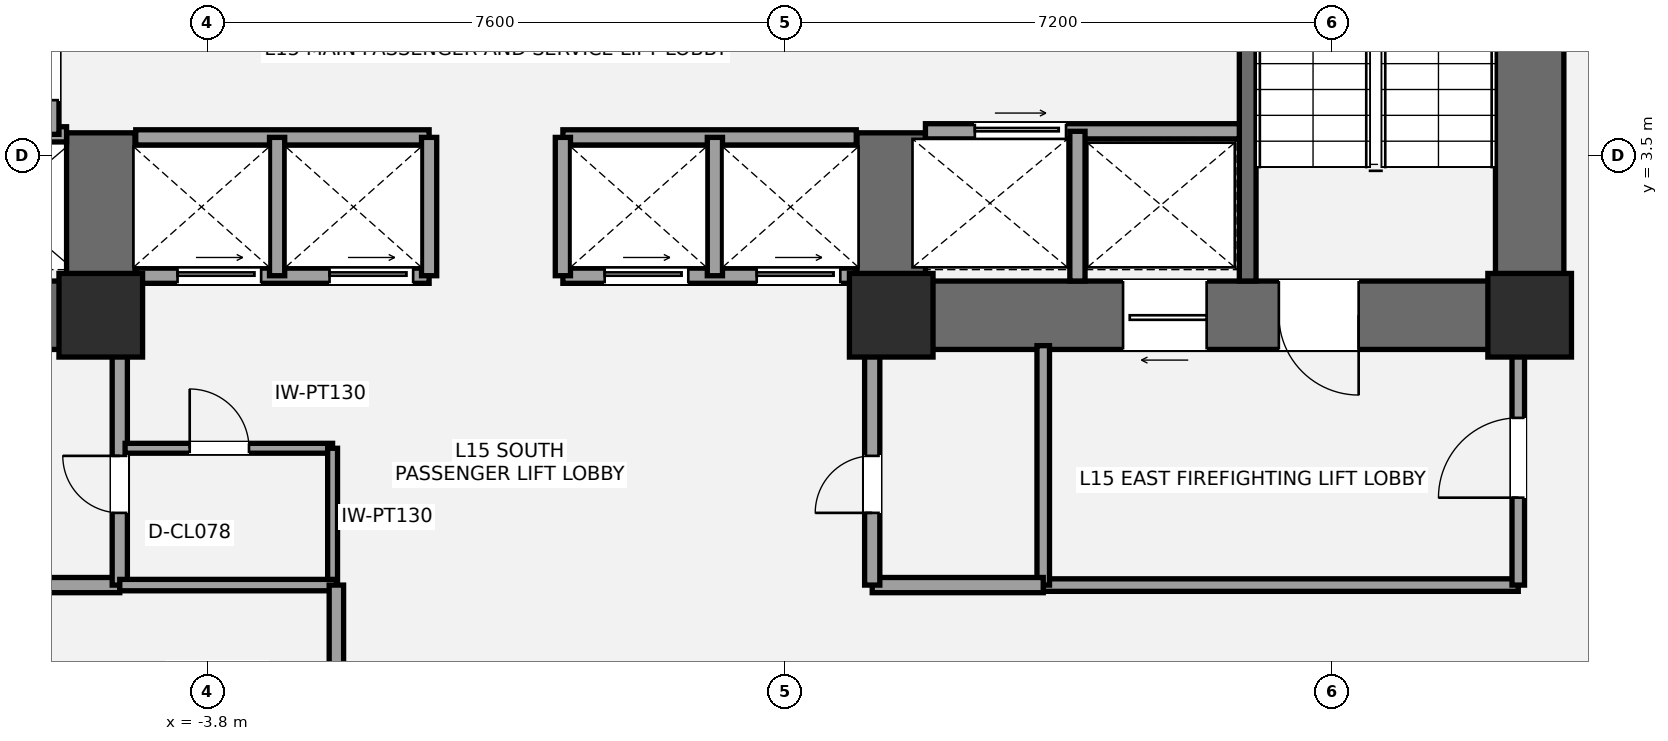
"""IFC4 building model, lengths in metres.
Left out: names, types, materials, properties, quantities, classifications, styles, units other than length and angle.
Written with IfcOpenShell. Run it as: python <this file> out.ifc"""

import sys

from ifc_helpers import new_model, si_unit, direction, frame, frame_2d, origin, origin_2d, place, context, subcontext, project, spatial, rectangle, extrude, element, fill, save


model = new_model("IFC4")
c1 = context("Model", 3, precision=1e-05, world=origin(), true_north=direction((0.0, 1.0)))
c2 = subcontext(c1, "Body", "Model", "MODEL_VIEW")
j1 = project(units=[si_unit("LENGTHUNIT", "METRE"), si_unit("PLANEANGLEUNIT", "RADIAN")], contexts=[c1])
p1 = place(None, origin())
s1 = spatial("IfcSite", under=j1, at=p1, CompositionType="ELEMENT")
p2 = place(p1, origin())
s2 = spatial("IfcBuilding", under=s1, at=p2, CompositionType="ELEMENT")
p3 = place(p2, frame((0.0, 0.0, 59.4)))
s3 = spatial("IfcBuildingStorey", under=s2, at=p3, CompositionType="ELEMENT", Elevation=59.4)
p4 = place(p3, frame((-4.75, 1.4, 0.0), z_axis=(0.0, 0.0, 1.0), x_axis=(-1.0, 0.0, 0.0)))
e1 = element("IfcWall", 1, at=p4, inside=s3, PredefinedType="SHEAR", context=c2, shape_type="SweptSolid", body=[
    extrude(rectangle(XDim=9.3, YDim=0.9, at=frame_2d((4.65, 0.0))), origin(), (0.0, 0.0, 1.0), 3.6),
])
p5 = place(p4, frame((5.55, 0.0, 0.0)))
e2 = element("IfcOpeningElement", 2, at=p5, cuts=e1, PredefinedType="OPENING", context=c2, shape_type="SweptSolid", body=[
    extrude(rectangle(XDim=1.05, YDim=2.15, at=frame_2d((0.525, 1.075))), frame((0.0, 0.46, 0.0), z_axis=(0.0, -1.0, 0.0), x_axis=(1.0, 0.0, 0.0)), (0.0, 0.0, 1.0), 0.92),
])
p6 = place(p4, frame((3.88, 0.0, 0.0)))
e3 = element("IfcOpeningElement", 3, at=p6, cuts=e1, PredefinedType="OPENING", context=c2, shape_type="SweptSolid", body=[
    extrude(rectangle(XDim=1.1, YDim=2.2, at=frame_2d((0.55, 1.1))), frame((0.0, 0.46, 0.0), z_axis=(0.0, -1.0, 0.0), x_axis=(1.0, 0.0, 0.0)), (0.0, 0.0, 1.0), 0.92),
])
p7 = place(p3, frame((-5.2, 0.95, 0.0), z_axis=(0.0, 0.0, 1.0), x_axis=(0.0, 1.0, 0.0)))
e4 = element("IfcWall", 4, at=p7, inside=s3, PredefinedType="SHEAR", context=c2, shape_type="SweptSolid", body=[
    extrude(rectangle(XDim=2.85, YDim=0.9, at=frame_2d((1.425, 0.0))), origin(), (0.0, 0.0, 1.0), 3.6),
])
p8 = place(p3, frame((13.6, 0.95, 0.0), z_axis=(0.0, 0.0, 1.0), x_axis=(0.0, 1.0, 0.0)))
e5 = element("IfcWall", 5, at=p8, inside=s3, PredefinedType="SHEAR", context=c2, shape_type="SweptSolid", body=[
    extrude(rectangle(XDim=8.95, YDim=0.9, at=frame_2d((4.475, 0.0))), origin(), (0.0, 0.0, 1.0), 3.6),
])
p9 = place(p3, frame((14.05, 1.4, 0.0), z_axis=(0.0, 0.0, 1.0), x_axis=(-1.0, 0.0, 0.0)))
e6 = element("IfcWall", 6, at=p9, inside=s3, PredefinedType="SHEAR", context=c2, shape_type="SweptSolid", body=[
    extrude(rectangle(XDim=9.3, YDim=0.9, at=frame_2d((4.65, 0.0))), origin(), (0.0, 0.0, 1.0), 3.6),
])
p10 = place(p9, frame((2.7, 0.0, 0.0)))
e7 = element("IfcOpeningElement", 7, at=p10, cuts=e6, PredefinedType="OPENING", context=c2, shape_type="SweptSolid", body=[
    extrude(rectangle(XDim=1.05, YDim=2.15, at=frame_2d((0.525, 1.075))), frame((0.0, 0.46, 0.0), z_axis=(0.0, -1.0, 0.0), x_axis=(1.0, 0.0, 0.0)), (0.0, 0.0, 1.0), 0.92),
])
p11 = place(p9, frame((4.7, 0.0, 0.0)))
e8 = element("IfcOpeningElement", 8, at=p11, cuts=e6, PredefinedType="OPENING", context=c2, shape_type="SweptSolid", body=[
    extrude(rectangle(XDim=1.1, YDim=2.2, at=frame_2d((0.55, 1.1))), frame((0.0, 0.46, 0.0), z_axis=(0.0, -1.0, 0.0), x_axis=(1.0, 0.0, 0.0)), (0.0, 0.0, 1.0), 0.92),
])
p12 = place(p3, frame((5.2, 0.95, 0.0), z_axis=(0.0, 0.0, 1.0), x_axis=(0.0, 1.0, 0.0)))
e9 = element("IfcWall", 9, at=p12, inside=s3, PredefinedType="SHEAR", context=c2, shape_type="SweptSolid", body=[
    extrude(rectangle(XDim=2.85, YDim=0.9, at=frame_2d((1.425, 0.0))), origin(), (0.0, 0.0, 1.0), 3.6),
])
p13 = place(p3, frame((9.89, 1.85, 0.0), z_axis=(0.0, 0.0, 1.0), x_axis=(0.0, 1.0, 0.0)))
e10 = element("IfcWall", 10, at=p13, inside=s3, PredefinedType="SHEAR", context=c2, shape_type="SweptSolid", body=[
    extrude(rectangle(XDim=7.15, YDim=0.22, at=frame_2d((3.575, 0.0))), origin(), (0.0, 0.0, 1.0), 3.6),
])
for number, where, z_axis, x_axis in (
    (11, (-5.2, 1.4, 0.0), (0.0, 0.0, 1.0), (1.0, 0.0, 0.0)),
    (12, (5.2, 1.4, 0.0), (0.0, 0.0, 1.0), (1.0, 0.0, 0.0)),
    (13, (13.6, 1.4, 0.0), (0.0, 0.0, 1.0), (1.0, 0.0, 0.0)),
):
    element("IfcColumn", number, at=place(p3, frame(where, z_axis=z_axis, x_axis=x_axis)), inside=s3, PredefinedType="COLUMN", context=c2, shape_type="SweptSolid", body=[
        extrude(rectangle(XDim=1.1, YDim=1.1, at=origin_2d()), origin(), (0.0, 0.0, 1.0), 3.6),
    ])
p14 = place(p3, frame((-7.2, -2.15, 0.0), z_axis=(0.0, 0.0, 1.0), x_axis=(1.0, 0.0, 0.0)))
e14 = element("IfcWall", 14, at=p14, inside=s3, PredefinedType="SOLIDWALL", context=c2, shape_type="SweptSolid", body=[
    extrude(rectangle(XDim=2.25, YDim=0.2, at=frame_2d((1.125, 0.0))), origin(), (0.0, 0.0, 1.0), 3.4),
])
p15 = place(p3, frame((-4.95, -2.15, 0.0), z_axis=(0.0, 0.0, 1.0), x_axis=(0.0, 1.0, 0.0)))
e15 = element("IfcWall", 15, at=p15, inside=s3, PredefinedType="SOLIDWALL", context=c2, shape_type="SweptSolid", body=[
    extrude(rectangle(XDim=3.15, YDim=0.2, at=frame_2d((1.575, 0.0))), origin(), (0.0, 0.0, 1.0), 2.853),
])
p16 = place(p15, frame((0.95, 0.0, 0.0)))
e16 = element("IfcOpeningElement", 16, at=p16, cuts=e15, PredefinedType="OPENING", context=c2, shape_type="SweptSolid", body=[
    extrude(rectangle(XDim=0.75, YDim=2.1, at=frame_2d((0.375, 1.05))), frame((0.0, 0.11, 0.0), z_axis=(0.0, -1.0, 0.0), x_axis=(1.0, 0.0, 0.0)), (0.0, 0.0, 1.0), 0.22),
])
p17 = place(p3, frame((7.2, -2.15, 0.0), z_axis=(0.0, 0.0, 1.0), x_axis=(1.0, 0.0, 0.0)))
e17 = element("IfcWall", 17, at=p17, inside=s3, PredefinedType="PARTITIONING", context=c2, shape_type="SweptSolid", body=[
    extrude(rectangle(XDim=6.25, YDim=0.165, at=frame_2d((3.125, 0.0))), origin(), (0.0, 0.0, 1.0), 3.4),
])
p18 = place(p3, frame((7.2, -2.15, 0.0), z_axis=(0.0, 0.0, 1.0), x_axis=(0.0, 1.0, 0.0)))
e18 = element("IfcWall", 18, at=p18, inside=s3, PredefinedType="PARTITIONING", context=c2, shape_type="SweptSolid", body=[
    extrude(rectangle(XDim=3.15, YDim=0.165, at=frame_2d((1.575, 0.0))), origin(), (0.0, 0.0, 1.0), 2.853),
])
p19 = place(p3, frame((13.45, -2.15, 0.0), z_axis=(0.0, 0.0, 1.0), x_axis=(0.0, 1.0, 0.0)))
e19 = element("IfcWall", 19, at=p19, inside=s3, PredefinedType="PARTITIONING", context=c2, shape_type="SweptSolid", body=[
    extrude(rectangle(XDim=3.15, YDim=0.165, at=frame_2d((1.575, 0.0))), origin(), (0.0, 0.0, 1.0), 2.853),
])
p20 = place(p19, frame((1.15, 0.0, 0.0)))
e20 = element("IfcOpeningElement", 20, at=p20, cuts=e19, PredefinedType="OPENING", context=c2, shape_type="SweptSolid", body=[
    extrude(rectangle(XDim=1.05, YDim=2.15, at=frame_2d((0.525, 1.075))), frame((0.0, 0.093, 0.0), z_axis=(0.0, -1.0, 0.0), x_axis=(1.0, 0.0, 0.0)), (0.0, 0.0, 1.0), 0.185),
])
p21 = place(p3, frame((4.95, -2.15, 0.0), z_axis=(0.0, 0.0, 1.0), x_axis=(1.0, 0.0, 0.0)))
e21 = element("IfcWall", 21, at=p21, inside=s3, PredefinedType="SOLIDWALL", context=c2, shape_type="SweptSolid", body=[
    extrude(rectangle(XDim=2.25, YDim=0.2, at=frame_2d((1.125, 0.0))), origin(), (0.0, 0.0, 1.0), 3.4),
])
p22 = place(p3, frame((4.95, -2.15, 0.0), z_axis=(0.0, 0.0, 1.0), x_axis=(0.0, 1.0, 0.0)))
e22 = element("IfcWall", 22, at=p22, inside=s3, PredefinedType="SOLIDWALL", context=c2, shape_type="SweptSolid", body=[
    extrude(rectangle(XDim=3.15, YDim=0.2, at=frame_2d((1.575, 0.0))), origin(), (0.0, 0.0, 1.0), 2.853),
])
p23 = place(p22, frame((0.95, 0.0, 0.0)))
e23 = element("IfcOpeningElement", 23, at=p23, cuts=e22, PredefinedType="OPENING", context=c2, shape_type="SweptSolid", body=[
    extrude(rectangle(XDim=0.75, YDim=2.1, at=frame_2d((0.375, 1.05))), frame((0.0, 0.11, 0.0), z_axis=(0.0, -1.0, 0.0), x_axis=(1.0, 0.0, 0.0)), (0.0, 0.0, 1.0), 0.22),
])
p24 = place(p3, frame((-4.88, -0.35, 0.0), z_axis=(0.0, 0.0, 1.0), x_axis=(1.0, 0.0, 0.0)))
e24 = element("IfcWall", 24, at=p24, inside=s3, PredefinedType="PARTITIONING", context=c2, shape_type="SweptSolid", body=[
    extrude(rectangle(XDim=2.73, YDim=0.13, at=frame_2d((1.365, 0.0))), origin(), (0.0, 0.0, 1.0), 3.4),
])
p25 = place(p24, frame((0.85, 0.0, 0.0)))
e25 = element("IfcOpeningElement", 25, at=p25, cuts=e24, PredefinedType="OPENING", context=c2, shape_type="SweptSolid", body=[
    extrude(rectangle(XDim=0.78, YDim=2.1, at=frame_2d((0.39, 1.05))), frame((0.0, 0.075, 0.0), z_axis=(0.0, -1.0, 0.0), x_axis=(1.0, 0.0, 0.0)), (0.0, 0.0, 1.0), 0.15),
])
p26 = place(p3, frame((-2.15, -2.15, 0.0), z_axis=(0.0, 0.0, 1.0), x_axis=(0.0, 1.0, 0.0)))
e26 = element("IfcWall", 26, at=p26, inside=s3, PredefinedType="PARTITIONING", context=c2, shape_type="SweptSolid", body=[
    extrude(rectangle(XDim=1.8, YDim=0.13, at=frame_2d((0.9, 0.0))), origin(), (0.0, 0.0, 1.0), 3.4),
])
p27 = place(p3, frame((-9.78, 3.78, 0.0), z_axis=(0.0, 0.0, 1.0), x_axis=(1.0, 0.0, 0.0)))
e27 = element("IfcWall", 27, at=p27, inside=s3, PredefinedType="SOLIDWALL", context=c2, shape_type="SweptSolid", body=[
    extrude(rectangle(XDim=4.13, YDim=0.2, at=frame_2d((2.065, 0.0))), origin(), (0.0, 0.0, 1.0), 3.4),
])
p28 = place(p3, frame((-5.85, 3.78, 0.0), z_axis=(0.0, 0.0, 1.0), x_axis=(0.0, 1.0, 0.0)))
e28 = element("IfcWall", 28, at=p28, inside=s3, PredefinedType="SOLIDWALL", context=c2, shape_type="SweptSolid", body=[
    extrude(rectangle(XDim=1.69, YDim=0.2, at=frame_2d((0.845, 0.0))), origin(), (0.0, 0.0, 1.0), 3.4),
])
p29 = place(p28, frame((0.45, 0.0, 0.0)))
e29 = element("IfcOpeningElement", 29, at=p29, cuts=e28, PredefinedType="OPENING", context=c2, shape_type="SweptSolid", body=[
    extrude(rectangle(XDim=0.75, YDim=2.1, at=frame_2d((0.375, 1.05))), frame((0.0, 0.11, 0.0), z_axis=(0.0, -1.0, 0.0), x_axis=(1.0, 0.0, 0.0)), (0.0, 0.0, 1.0), 0.22),
])
p30 = place(p3, frame((5.65, 3.82, 0.0), z_axis=(0.0, 0.0, 1.0), x_axis=(1.0, 0.0, 0.0)))
e30 = element("IfcWall", 30, at=p30, inside=s3, PredefinedType="SOLIDWALL", context=c2, shape_type="SweptSolid", body=[
    extrude(rectangle(XDim=4.13, YDim=0.2, at=frame_2d((2.065, 0.0))), origin(), (0.0, 0.0, 1.0), 3.4),
])
p31 = place(p30, frame((0.65, 0.0, 0.0)))
e31 = element("IfcOpeningElement", 31, at=p31, cuts=e30, PredefinedType="OPENING", context=c2, shape_type="SweptSolid", body=[
    extrude(rectangle(XDim=1.2, YDim=2.2, at=frame_2d((0.6, 1.1))), frame((0.0, 0.11, 0.0), z_axis=(0.0, -1.0, 0.0), x_axis=(1.0, 0.0, 0.0)), (0.0, 0.0, 1.0), 0.22),
])
p32 = place(p3, frame((7.65, 1.85, 0.0), z_axis=(0.0, 0.0, 1.0), x_axis=(0.0, 1.0, 0.0)))
e32 = element("IfcWall", 32, at=p32, inside=s3, PredefinedType="SOLIDWALL", context=c2, shape_type="SweptSolid", body=[
    extrude(rectangle(XDim=1.97, YDim=0.2, at=frame_2d((0.985, 0.0))), origin(), (0.0, 0.0, 1.0), 3.4),
])
p33 = place(p3, frame((-4.74, 1.92, 0.0), z_axis=(0.0, 0.0, 1.0), x_axis=(1.0, 0.0, 0.0)))
e33 = element("IfcWall", 33, at=p33, inside=s3, PredefinedType="SOLIDWALL", context=c2, shape_type="SweptSolid", body=[
    extrude(rectangle(XDim=3.86, YDim=0.2, at=frame_2d((1.93, 0.0))), origin(), (0.0, 0.0, 1.0), 2.39),
])
p34 = place(p33, frame((0.55, 0.0, 0.0)))
e34 = element("IfcOpeningElement", 34, at=p34, cuts=e33, PredefinedType="OPENING", context=c2, shape_type="SweptSolid", body=[
    extrude(rectangle(XDim=1.1, YDim=2.2, at=frame_2d((0.55, 1.1))), frame((0.0, 0.11, 0.0), z_axis=(0.0, -1.0, 0.0), x_axis=(1.0, 0.0, 0.0)), (0.0, 0.0, 1.0), 0.22),
])
p35 = place(p33, frame((2.55, 0.0, 0.0)))
e35 = element("IfcOpeningElement", 35, at=p35, cuts=e33, PredefinedType="OPENING", context=c2, shape_type="SweptSolid", body=[
    extrude(rectangle(XDim=1.1, YDim=2.2, at=frame_2d((0.55, 1.1))), frame((0.0, 0.11, 0.0), z_axis=(0.0, -1.0, 0.0), x_axis=(1.0, 0.0, 0.0)), (0.0, 0.0, 1.0), 0.22),
])
p36 = place(p3, frame((0.88, 1.92, 0.0), z_axis=(0.0, 0.0, 1.0), x_axis=(1.0, 0.0, 0.0)))
e36 = element("IfcWall", 36, at=p36, inside=s3, PredefinedType="SOLIDWALL", context=c2, shape_type="SweptSolid", body=[
    extrude(rectangle(XDim=3.86, YDim=0.2, at=frame_2d((1.93, 0.0))), origin(), (0.0, 0.0, 1.0), 2.39),
])
p37 = place(p36, frame((0.55, 0.0, 0.0)))
e37 = element("IfcOpeningElement", 37, at=p37, cuts=e36, PredefinedType="OPENING", context=c2, shape_type="SweptSolid", body=[
    extrude(rectangle(XDim=1.1, YDim=2.2, at=frame_2d((0.55, 1.1))), frame((0.0, 0.11, 0.0), z_axis=(0.0, -1.0, 0.0), x_axis=(1.0, 0.0, 0.0)), (0.0, 0.0, 1.0), 0.22),
])
p38 = place(p36, frame((2.55, 0.0, 0.0)))
e38 = element("IfcOpeningElement", 38, at=p38, cuts=e36, PredefinedType="OPENING", context=c2, shape_type="SweptSolid", body=[
    extrude(rectangle(XDim=1.1, YDim=2.2, at=frame_2d((0.55, 1.1))), frame((0.0, 0.11, 0.0), z_axis=(0.0, -1.0, 0.0), x_axis=(1.0, 0.0, 0.0)), (0.0, 0.0, 1.0), 0.22),
])
for number, where, z_axis, x_axis in (
    (39, (-4.74, 3.74, 0.0), (0.0, 0.0, 1.0), (1.0, 0.0, 0.0)),
    (40, (0.88, 3.74, 0.0), (0.0, 0.0, 1.0), (1.0, 0.0, 0.0)),
):
    element("IfcWall", number, at=place(p3, frame(where, z_axis=z_axis, x_axis=x_axis)), inside=s3, PredefinedType="SOLIDWALL", context=c2, shape_type="SweptSolid", body=[
        extrude(rectangle(XDim=3.86, YDim=0.2, at=frame_2d((1.93, 0.0))), origin(), (0.0, 0.0, 1.0), 3.4),
    ])
for number, where, z_axis, x_axis in (
    (41, (-2.88, 1.92, 0.0), (0.0, 0.0, 1.0), (0.0, 1.0, 0.0)),
    (42, (2.88, 1.92, 0.0), (0.0, 0.0, 1.0), (0.0, 1.0, 0.0)),
    (43, (-0.88, 1.92, 0.0), (0.0, 0.0, 1.0), (0.0, 1.0, 0.0)),
    (44, (0.88, 1.92, 0.0), (0.0, 0.0, 1.0), (0.0, 1.0, 0.0)),
):
    element("IfcWall", number, at=place(p3, frame(where, z_axis=z_axis, x_axis=x_axis)), inside=s3, PredefinedType="SOLIDWALL", context=c2, shape_type="SweptSolid", body=[
        extrude(rectangle(XDim=1.82, YDim=0.2, at=frame_2d((0.91, 0.0))), origin(), (0.0, 0.0, 1.0), 3.4),
    ])
p39 = place(p3, frame((-4.95, -2.15, 0.0), z_axis=(0.0, 0.0, 1.0), x_axis=(1.0, 0.0, 0.0)))
e45 = element("IfcWall", 45, at=p39, inside=s3, PredefinedType="PLUMBINGWALL", context=c2, shape_type="SweptSolid", body=[
    extrude(rectangle(XDim=2.85, YDim=0.15, at=frame_2d((1.425, 0.0))), origin(), (0.0, 0.0, 1.0), 3.4),
])
p40 = place(p3, frame((-2.1, -4.05, 0.0), z_axis=(0.0, 0.0, 1.0), x_axis=(0.0, 1.0, 0.0)))
e46 = element("IfcWall", 46, at=p40, inside=s3, PredefinedType="PLUMBINGWALL", context=c2, shape_type="SweptSolid", body=[
    extrude(rectangle(XDim=1.9, YDim=0.19, at=frame_2d((0.95, 0.0))), origin(), (0.0, 0.0, 1.0), 3.4),
])
p41 = place(p10, origin())
e47 = element("IfcDoor", 47, at=p41, inside=s3, OperationType="SINGLE_SWING_LEFT", PredefinedType="DOOR", context=c2, shape_type="SweptSolid", body=[
    extrude(rectangle(XDim=1.05, YDim=2.15, at=frame_2d((0.525, 1.075))), frame((0.0, 0.025, 0.0), z_axis=(0.0, -1.0, 0.0), x_axis=(1.0, 0.0, 0.0)), (0.0, 0.0, 1.0), 0.05),
])
fill(e7, e47)
p42 = place(p16, origin())
e48 = element("IfcDoor", 48, at=p42, inside=s3, OperationType="SINGLE_SWING_RIGHT", PredefinedType="DOOR", context=c2, shape_type="SweptSolid", body=[
    extrude(rectangle(XDim=0.75, YDim=2.1, at=frame_2d((0.375, 1.05))), frame((0.0, 0.025, 0.0), z_axis=(0.0, -1.0, 0.0), x_axis=(1.0, 0.0, 0.0)), (0.0, 0.0, 1.0), 0.05),
])
fill(e16, e48)
p43 = place(p20, origin())
e49 = element("IfcDoor", 49, at=p43, inside=s3, OperationType="SINGLE_SWING_LEFT", PredefinedType="DOOR", context=c2, shape_type="SweptSolid", body=[
    extrude(rectangle(XDim=1.05, YDim=2.15, at=frame_2d((0.525, 1.075))), frame((0.0, 0.025, 0.0), z_axis=(0.0, -1.0, 0.0), x_axis=(1.0, 0.0, 0.0)), (0.0, 0.0, 1.0), 0.05),
])
fill(e20, e49)
p44 = place(p23, origin())
e50 = element("IfcDoor", 50, at=p44, inside=s3, OperationType="SINGLE_SWING_LEFT", PredefinedType="DOOR", context=c2, shape_type="SweptSolid", body=[
    extrude(rectangle(XDim=0.75, YDim=2.1, at=frame_2d((0.375, 1.05))), frame((0.0, 0.025, 0.0), z_axis=(0.0, -1.0, 0.0), x_axis=(1.0, 0.0, 0.0)), (0.0, 0.0, 1.0), 0.05),
])
fill(e23, e50)
p45 = place(p25, origin())
e51 = element("IfcDoor", 51, at=p45, inside=s3, OperationType="SINGLE_SWING_LEFT", PredefinedType="DOOR", context=c2, shape_type="SweptSolid", body=[
    extrude(rectangle(XDim=0.78, YDim=2.1, at=frame_2d((0.39, 1.05))), frame((0.0, 0.025, 0.0), z_axis=(0.0, -1.0, 0.0), x_axis=(1.0, 0.0, 0.0)), (0.0, 0.0, 1.0), 0.05),
])
fill(e25, e51)
p46 = place(p29, origin())
e52 = element("IfcDoor", 52, at=p46, inside=s3, OperationType="SINGLE_SWING_RIGHT", PredefinedType="DOOR", context=c2, shape_type="SweptSolid", body=[
    extrude(rectangle(XDim=0.75, YDim=2.1, at=frame_2d((0.375, 1.05))), frame((0.0, 0.025, 0.0), z_axis=(0.0, -1.0, 0.0), x_axis=(1.0, 0.0, 0.0)), (0.0, 0.0, 1.0), 0.05),
])
fill(e29, e52)
p47 = place(p11, origin())
e53 = element("IfcDoor", 53, at=p47, inside=s3, OperationType="SLIDING_TO_LEFT", PredefinedType="DOOR", context=c2, shape_type="SweptSolid", body=[
    extrude(rectangle(XDim=1.1, YDim=2.2, at=frame_2d((0.55, 1.1))), frame((0.0, 0.025, 0.0), z_axis=(0.0, -1.0, 0.0), x_axis=(1.0, 0.0, 0.0)), (0.0, 0.0, 1.0), 0.05),
])
fill(e8, e53)
p48 = place(p31, origin())
e54 = element("IfcDoor", 54, at=p48, inside=s3, OperationType="SLIDING_TO_RIGHT", PredefinedType="DOOR", context=c2, shape_type="SweptSolid", body=[
    extrude(rectangle(XDim=1.2, YDim=2.2, at=frame_2d((0.6, 1.1))), frame((0.0, 0.025, 0.0), z_axis=(0.0, -1.0, 0.0), x_axis=(1.0, 0.0, 0.0)), (0.0, 0.0, 1.0), 0.05),
])
fill(e31, e54)
p49 = place(p34, origin())
e55 = element("IfcDoor", 55, at=p49, inside=s3, OperationType="SLIDING_TO_LEFT", PredefinedType="DOOR", context=c2, shape_type="SweptSolid", body=[
    extrude(rectangle(XDim=1.1, YDim=2.2, at=frame_2d((0.55, 1.1))), frame((0.0, 0.025, 0.0), z_axis=(0.0, -1.0, 0.0), x_axis=(1.0, 0.0, 0.0)), (0.0, 0.0, 1.0), 0.05),
])
fill(e34, e55)
p50 = place(p35, origin())
e56 = element("IfcDoor", 56, at=p50, inside=s3, OperationType="SLIDING_TO_LEFT", PredefinedType="DOOR", context=c2, shape_type="SweptSolid", body=[
    extrude(rectangle(XDim=1.1, YDim=2.2, at=frame_2d((0.55, 1.1))), frame((0.0, 0.025, 0.0), z_axis=(0.0, -1.0, 0.0), x_axis=(1.0, 0.0, 0.0)), (0.0, 0.0, 1.0), 0.05),
])
fill(e35, e56)
p51 = place(p37, origin())
e57 = element("IfcDoor", 57, at=p51, inside=s3, OperationType="SLIDING_TO_LEFT", PredefinedType="DOOR", context=c2, shape_type="SweptSolid", body=[
    extrude(rectangle(XDim=1.1, YDim=2.2, at=frame_2d((0.55, 1.1))), frame((0.0, 0.025, 0.0), z_axis=(0.0, -1.0, 0.0), x_axis=(1.0, 0.0, 0.0)), (0.0, 0.0, 1.0), 0.05),
])
fill(e37, e57)
p52 = place(p38, origin())
e58 = element("IfcDoor", 58, at=p52, inside=s3, OperationType="SLIDING_TO_LEFT", PredefinedType="DOOR", context=c2, shape_type="SweptSolid", body=[
    extrude(rectangle(XDim=1.1, YDim=2.2, at=frame_2d((0.55, 1.1))), frame((0.0, 0.025, 0.0), z_axis=(0.0, -1.0, 0.0), x_axis=(1.0, 0.0, 0.0)), (0.0, 0.0, 1.0), 0.05),
])
fill(e38, e58)
save(model, sys.argv[1])
